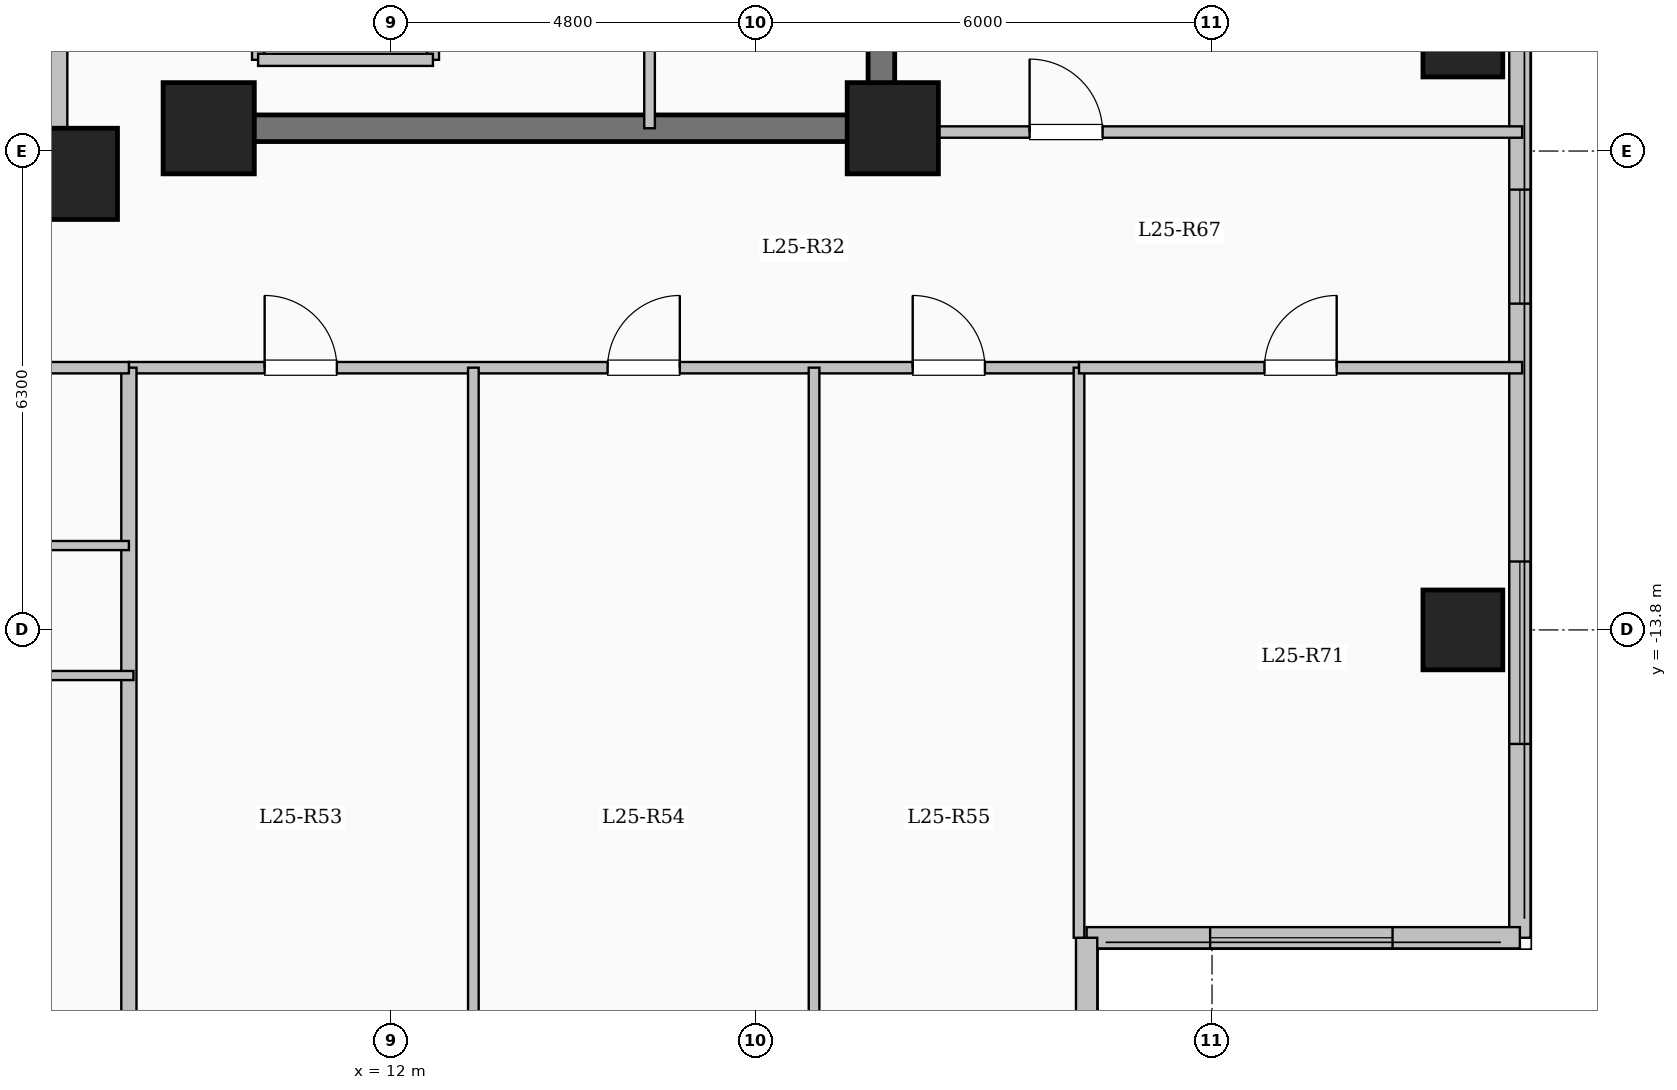
"""IFC4 building model, lengths in metres.
Left out: names, types, materials, properties, quantities, classifications, styles, units other than length and angle.
Written with IfcOpenShell. Run it as: python <this file> out.ifc"""

import sys

from ifc_helpers import new_model, si_unit, direction, frame, frame_2d, origin, origin_2d, place, context, subcontext, project, spatial, rectangle, extrude, element, fill, save


model = new_model("IFC4")
c1 = context("Model", 3, precision=1e-05, world=origin(), true_north=direction((0.0, 1.0)))
c2 = subcontext(c1, "Body", "Model", "MODEL_VIEW")
j1 = project(units=[si_unit("LENGTHUNIT", "METRE"), si_unit("PLANEANGLEUNIT", "RADIAN")], contexts=[c1])
p1 = place(None, origin())
s1 = spatial("IfcSite", under=j1, at=p1, CompositionType="ELEMENT")
p2 = place(p1, origin())
s2 = spatial("IfcBuilding", under=s1, at=p2, CompositionType="ELEMENT")
p3 = place(p2, frame((0.0, 0.0, 95.05)))
s3 = spatial("IfcBuildingStorey", under=s2, at=p3, CompositionType="ELEMENT", Elevation=95.05)
for number, where, z_axis, x_axis in (
    (1, (7.8, -7.8, 0.0), (0.0, 0.0, 1.0), (1.0, 0.0, 0.0)),
    (2, (9.6, -7.2, 0.0), (0.0, 0.0, 1.0), (1.0, 0.0, 0.0)),
    (3, (18.6, -7.2, 0.0), (0.0, 0.0, 1.0), (1.0, 0.0, 0.0)),
):
    element("IfcColumn", number, at=place(p3, frame(where, z_axis=z_axis, x_axis=x_axis)), inside=s3, PredefinedType="COLUMN", context=c2, shape_type="SweptSolid", body=[
        extrude(rectangle(XDim=1.2, YDim=1.2, at=origin_2d()), origin(), (0.0, 0.0, 1.0), 3.35),
    ])
for number, where, z_axis, x_axis in (
    (4, (26.1, -13.8, 0.0), (0.0, 0.0, 1.0), (1.0, 0.0, 0.0)),
    (5, (26.1, -6.0, 0.0), (0.0, 0.0, 1.0), (1.0, 0.0, 0.0)),
):
    element("IfcColumn", number, at=place(p3, frame(where, z_axis=z_axis, x_axis=x_axis)), inside=s3, PredefinedType="COLUMN", context=c2, shape_type="SweptSolid", body=[
        extrude(rectangle(XDim=1.05, YDim=1.05, at=origin_2d()), origin(), (0.0, 0.0, 1.0), 3.35),
    ])
p4 = place(p3, frame((-7.62, -7.62, 0.0), z_axis=(0.0, 0.0, 1.0), x_axis=(1.0, 0.0, 0.0)))
e6 = element("IfcWall", 6, at=p4, inside=s3, PredefinedType="SOLIDWALL", context=c2, shape_type="SweptSolid", body=[
    extrude(rectangle(XDim=15.24, YDim=0.24, at=frame_2d((7.62, 0.0))), origin(), (0.0, 0.0, 1.0), 3.1),
])
p5 = place(p4, frame((6.92, 0.0, 0.95)))
e7 = element("IfcOpeningElement", 7, at=p5, cuts=e6, PredefinedType="OPENING", context=c2, shape_type="SweptSolid", body=[
    extrude(rectangle(XDim=1.4, YDim=1.5, at=frame_2d((0.7, 0.75))), frame((0.0, 0.13, 0.0), z_axis=(0.0, -1.0, 0.0), x_axis=(1.0, 0.0, 0.0)), (0.0, 0.0, 1.0), 0.26),
])
p6 = place(p3, frame((7.62, -7.62, 0.0), z_axis=(0.0, 0.0, 1.0), x_axis=(0.0, 1.0, 0.0)))
e8 = element("IfcWall", 8, at=p6, inside=s3, PredefinedType="SOLIDWALL", context=c2, shape_type="SweptSolid", body=[
    extrude(rectangle(XDim=15.24, YDim=0.24, at=frame_2d((7.62, 0.0))), origin(), (0.0, 0.0, 1.0), 3.1),
])
p7 = place(p6, frame((6.92, 0.0, 0.95)))
e9 = element("IfcOpeningElement", 9, at=p7, cuts=e8, PredefinedType="OPENING", context=c2, shape_type="SweptSolid", body=[
    extrude(rectangle(XDim=1.4, YDim=1.5, at=frame_2d((0.7, 0.75))), frame((0.0, 0.13, 0.0), z_axis=(0.0, -1.0, 0.0), x_axis=(1.0, 0.0, 0.0)), (0.0, 0.0, 1.0), 0.26),
])
p8 = place(p3, frame((26.85, 17.85, 0.0), z_axis=(0.0, 0.0, 1.0), x_axis=(0.0, -1.0, 0.0)))
e10 = element("IfcWall", 10, at=p8, inside=s3, PredefinedType="SOLIDWALL", context=c2, shape_type="SweptSolid", body=[
    extrude(rectangle(XDim=35.7, YDim=0.28, at=frame_2d((17.85, 0.0))), origin(), (0.0, 0.0, 1.0), 3.1),
])
p9 = place(p8, frame((1.675, 0.0, 0.9)))
e11 = element("IfcOpeningElement", 11, at=p9, cuts=e10, PredefinedType="OPENING", context=c2, shape_type="SweptSolid", body=[
    extrude(rectangle(XDim=2.0, YDim=1.7, at=frame_2d((1.0, 0.85))), frame((0.0, 0.15, 0.0), z_axis=(0.0, -1.0, 0.0), x_axis=(1.0, 0.0, 0.0)), (0.0, 0.0, 1.0), 0.3),
])
p10 = place(p8, frame((5.725, 0.0, 0.95)))
e12 = element("IfcOpeningElement", 12, at=p10, cuts=e10, PredefinedType="OPENING", context=c2, shape_type="SweptSolid", body=[
    extrude(rectangle(XDim=1.0, YDim=1.5, at=frame_2d((0.5, 0.75))), frame((0.0, 0.15, 0.0), z_axis=(0.0, -1.0, 0.0), x_axis=(1.0, 0.0, 0.0)), (0.0, 0.0, 1.0), 0.3),
])
p11 = place(p8, frame((8.975, 0.0, 0.9)))
e13 = element("IfcOpeningElement", 13, at=p11, cuts=e10, PredefinedType="OPENING", context=c2, shape_type="SweptSolid", body=[
    extrude(rectangle(XDim=2.0, YDim=1.7, at=frame_2d((1.0, 0.85))), frame((0.0, 0.15, 0.0), z_axis=(0.0, -1.0, 0.0), x_axis=(1.0, 0.0, 0.0)), (0.0, 0.0, 1.0), 0.3),
])
p12 = place(p8, frame((13.725, 0.0, 0.9)))
e14 = element("IfcOpeningElement", 14, at=p12, cuts=e10, PredefinedType="OPENING", context=c2, shape_type="SweptSolid", body=[
    extrude(rectangle(XDim=1.8, YDim=1.65, at=frame_2d((0.9, 0.825))), frame((0.0, 0.15, 0.0), z_axis=(0.0, -1.0, 0.0), x_axis=(1.0, 0.0, 0.0)), (0.0, 0.0, 1.0), 0.3),
])
p13 = place(p8, frame((19.55, 0.0, 0.9)))
e15 = element("IfcOpeningElement", 15, at=p13, cuts=e10, PredefinedType="OPENING", context=c2, shape_type="SweptSolid", body=[
    extrude(rectangle(XDim=2.4, YDim=1.8, at=frame_2d((1.2, 0.9))), frame((0.0, 0.15, 0.0), z_axis=(0.0, -1.0, 0.0), x_axis=(1.0, 0.0, 0.0)), (0.0, 0.0, 1.0), 0.3),
])
p14 = place(p8, frame((25.857, 0.0, 0.9)))
e16 = element("IfcOpeningElement", 16, at=p14, cuts=e10, PredefinedType="OPENING", context=c2, shape_type="SweptSolid", body=[
    extrude(rectangle(XDim=1.5, YDim=1.65, at=frame_2d((0.75, 0.825))), frame((0.0, 0.15, 0.0), z_axis=(0.0, -1.0, 0.0), x_axis=(1.0, 0.0, 0.0)), (0.0, 0.0, 1.0), 0.3),
])
p15 = place(p8, frame((30.75, 0.0, 0.9)))
e17 = element("IfcOpeningElement", 17, at=p15, cuts=e10, PredefinedType="OPENING", context=c2, shape_type="SweptSolid", body=[
    extrude(rectangle(XDim=2.4, YDim=1.8, at=frame_2d((1.2, 0.9))), frame((0.0, 0.15, 0.0), z_axis=(0.0, -1.0, 0.0), x_axis=(1.0, 0.0, 0.0)), (0.0, 0.0, 1.0), 0.3),
])
p16 = place(p3, frame((26.85, -17.85, 0.0), z_axis=(0.0, 0.0, 1.0), x_axis=(-1.0, 0.0, 0.0)))
e18 = element("IfcWall", 18, at=p16, inside=s3, PredefinedType="SOLIDWALL", context=c2, shape_type="SweptSolid", body=[
    extrude(rectangle(XDim=5.7, YDim=0.28, at=frame_2d((2.85, 0.0))), origin(), (0.0, 0.0, 1.0), 3.1),
])
p17 = place(p16, frame((1.675, 0.0, 0.9)))
e19 = element("IfcOpeningElement", 19, at=p17, cuts=e18, PredefinedType="OPENING", context=c2, shape_type="SweptSolid", body=[
    extrude(rectangle(XDim=2.4, YDim=1.8, at=frame_2d((1.2, 0.9))), frame((0.0, 0.15, 0.0), z_axis=(0.0, -1.0, 0.0), x_axis=(1.0, 0.0, 0.0)), (0.0, 0.0, 1.0), 0.3),
])
p18 = place(p3, frame((21.15, -17.85, 0.0), z_axis=(0.0, 0.0, 1.0), x_axis=(0.0, -1.0, 0.0)))
e20 = element("IfcWall", 20, at=p18, inside=s3, PredefinedType="SOLIDWALL", context=c2, shape_type="SweptSolid", body=[
    extrude(rectangle(XDim=4.2, YDim=0.28, at=frame_2d((2.1, 0.0))), origin(), (0.0, 0.0, 1.0), 3.1),
])
p19 = place(p18, frame((1.082, 0.0, 0.9)))
e21 = element("IfcOpeningElement", 21, at=p19, cuts=e20, PredefinedType="OPENING", context=c2, shape_type="SweptSolid", body=[
    extrude(rectangle(XDim=2.0, YDim=1.7, at=frame_2d((1.0, 0.85))), frame((0.0, 0.15, 0.0), z_axis=(0.0, -1.0, 0.0), x_axis=(1.0, 0.0, 0.0)), (0.0, 0.0, 1.0), 0.3),
])
p20 = place(p3, frame((10.25, -6.3, 0.0), z_axis=(0.0, 0.0, 1.0), x_axis=(0.0, 1.0, 0.0)))
e22 = element("IfcWall", 22, at=p20, inside=s3, PredefinedType="SOLIDWALL", context=c2, shape_type="SweptSolid", body=[
    extrude(rectangle(XDim=2.6, YDim=0.16, at=frame_2d((1.3, 0.0))), origin(), (0.0, 0.0, 1.0), 3.1),
])
p21 = place(p20, frame((0.75, 0.0, 0.0)))
e23 = element("IfcOpeningElement", 23, at=p21, cuts=e22, PredefinedType="OPENING", context=c2, shape_type="SweptSolid", body=[
    extrude(rectangle(XDim=1.1, YDim=2.15, at=frame_2d((0.55, 1.075))), frame((0.0, 0.09, 0.0), z_axis=(0.0, -1.0, 0.0), x_axis=(1.0, 0.0, 0.0)), (0.0, 0.0, 1.0), 0.18),
])
p22 = place(p3, frame((12.55, -6.3, 0.0), z_axis=(0.0, 0.0, 1.0), x_axis=(0.0, 1.0, 0.0)))
e24 = element("IfcWall", 24, at=p22, inside=s3, PredefinedType="SOLIDWALL", context=c2, shape_type="SweptSolid", body=[
    extrude(rectangle(XDim=2.6, YDim=0.16, at=frame_2d((1.3, 0.0))), origin(), (0.0, 0.0, 1.0), 3.1),
])
p23 = place(p3, frame((10.25, -6.3, 0.0), z_axis=(0.0, 0.0, 1.0), x_axis=(1.0, 0.0, 0.0)))
e25 = element("IfcWall", 25, at=p23, inside=s3, PredefinedType="SOLIDWALL", context=c2, shape_type="SweptSolid", body=[
    extrude(rectangle(XDim=2.3, YDim=0.16, at=frame_2d((1.15, 0.0))), origin(), (0.0, 0.0, 1.0), 3.1),
])
p24 = place(p3, frame((18.45, -7.375, 0.0), z_axis=(0.0, 0.0, 1.0), x_axis=(0.0, 1.0, 0.0)))
e26 = element("IfcWall", 26, at=p24, inside=s3, PredefinedType="SHEAR", context=c2, shape_type="SweptSolid", body=[
    extrude(rectangle(XDim=14.05, YDim=0.35, at=frame_2d((7.025, 0.0))), origin(), (0.0, 0.0, 1.0), 3.35),
])
p25 = place(p3, frame((10.075, -7.2, 0.0), z_axis=(0.0, 0.0, 1.0), x_axis=(1.0, 0.0, 0.0)))
e27 = element("IfcWall", 27, at=p25, inside=s3, PredefinedType="SHEAR", context=c2, shape_type="SweptSolid", body=[
    extrude(rectangle(XDim=8.55, YDim=0.35, at=frame_2d((4.275, 0.0))), origin(), (0.0, 0.0, 1.0), 3.35),
])
p26 = place(p3, frame((15.4, -7.2, 0.0), z_axis=(0.0, 0.0, 1.0), x_axis=(0.0, 1.0, 0.0)))
e28 = element("IfcWall", 28, at=p26, inside=s3, PredefinedType="PARTITIONING", context=c2, shape_type="SweptSolid", body=[
    extrude(rectangle(XDim=10.45, YDim=0.14, at=frame_2d((5.225, 0.0))), origin(), (0.0, 0.0, 1.0), 3.1),
])
p27 = place(p26, frame((9.25, 0.0, 0.0)))
e29 = element("IfcOpeningElement", 29, at=p27, cuts=e28, PredefinedType="OPENING", context=c2, shape_type="SweptSolid", body=[
    extrude(rectangle(XDim=0.9, YDim=2.08, at=frame_2d((0.45, 1.04))), frame((0.0, 0.08, 0.0), z_axis=(0.0, -1.0, 0.0), x_axis=(1.0, 0.0, 0.0)), (0.0, 0.0, 1.0), 0.16),
])
p28 = place(p3, frame((8.55, -10.35, 0.0), z_axis=(0.0, 0.0, 1.0), x_axis=(1.0, 0.0, 0.0)))
e30 = element("IfcWall", 30, at=p28, inside=s3, PredefinedType="PARTITIONING", context=c2, shape_type="SweptSolid", body=[
    extrude(rectangle(XDim=12.5, YDim=0.15, at=frame_2d((6.25, 0.0))), origin(), (0.0, 0.0, 1.0), 3.1),
])
p29 = place(p28, frame((1.786, 0.0, 0.0)))
e31 = element("IfcOpeningElement", 31, at=p29, cuts=e30, PredefinedType="OPENING", context=c2, shape_type="SweptSolid", body=[
    extrude(rectangle(XDim=0.95, YDim=2.15, at=frame_2d((0.475, 1.075))), frame((0.0, 0.085, 0.0), z_axis=(0.0, -1.0, 0.0), x_axis=(1.0, 0.0, 0.0)), (0.0, 0.0, 1.0), 0.17),
])
p30 = place(p28, frame((6.298, 0.0, 0.0)))
e32 = element("IfcOpeningElement", 32, at=p30, cuts=e30, PredefinedType="OPENING", context=c2, shape_type="SweptSolid", body=[
    extrude(rectangle(XDim=0.95, YDim=2.15, at=frame_2d((0.475, 1.075))), frame((0.0, 0.085, 0.0), z_axis=(0.0, -1.0, 0.0), x_axis=(1.0, 0.0, 0.0)), (0.0, 0.0, 1.0), 0.17),
])
p31 = place(p28, frame((10.312, 0.0, 0.0)))
e33 = element("IfcOpeningElement", 33, at=p31, cuts=e30, PredefinedType="OPENING", context=c2, shape_type="SweptSolid", body=[
    extrude(rectangle(XDim=0.95, YDim=2.15, at=frame_2d((0.475, 1.075))), frame((0.0, 0.085, 0.0), z_axis=(0.0, -1.0, 0.0), x_axis=(1.0, 0.0, 0.0)), (0.0, 0.0, 1.0), 0.17),
])
for number, where, z_axis, x_axis in (
    (34, (13.082, -22.05, 0.0), (0.0, 0.0, 1.0), (0.0, 1.0, 0.0)),
    (35, (17.564, -22.05, 0.0), (0.0, 0.0, 1.0), (0.0, 1.0, 0.0)),
):
    element("IfcWall", number, at=place(p3, frame(where, z_axis=z_axis, x_axis=x_axis)), inside=s3, PredefinedType="PARTITIONING", context=c2, shape_type="SweptSolid", body=[
        extrude(rectangle(XDim=11.7, YDim=0.14, at=frame_2d((5.85, 0.0))), origin(), (0.0, 0.0, 1.0), 3.1),
    ])
p32 = place(p3, frame((8.55, -22.704, 0.0), z_axis=(0.0, 0.0, 1.0), x_axis=(0.0, 1.0, 0.0)))
e36 = element("IfcWall", 36, at=p32, inside=s3, PredefinedType="SOLIDWALL", context=c2, shape_type="SweptSolid", body=[
    extrude(rectangle(XDim=12.354, YDim=0.2, at=frame_2d((6.177, 0.0))), origin(), (0.0, 0.0, 1.0), 3.1),
])
p33 = place(p3, frame((-8.55, -10.35, 0.0), z_axis=(0.0, 0.0, 1.0), x_axis=(1.0, 0.0, 0.0)))
e37 = element("IfcWall", 37, at=p33, inside=s3, PredefinedType="PARTITIONING", context=c2, shape_type="SweptSolid", body=[
    extrude(rectangle(XDim=17.1, YDim=0.15, at=frame_2d((8.55, 0.0))), origin(), (0.0, 0.0, 1.0), 3.1),
])
p34 = place(p33, frame((1.6, 0.0, 0.0)))
e38 = element("IfcOpeningElement", 38, at=p34, cuts=e37, PredefinedType="OPENING", context=c2, shape_type="SweptSolid", body=[
    extrude(rectangle(XDim=0.96, YDim=2.15, at=frame_2d((0.48, 1.075))), frame((0.0, 0.085, 0.0), z_axis=(0.0, -1.0, 0.0), x_axis=(1.0, 0.0, 0.0)), (0.0, 0.0, 1.0), 0.17),
])
p35 = place(p3, frame((3.219, -12.69, 0.0), z_axis=(0.0, 0.0, 1.0), x_axis=(1.0, 0.0, 0.0)))
e39 = element("IfcWall", 39, at=p35, inside=s3, PredefinedType="PARTITIONING", context=c2, shape_type="SweptSolid", body=[
    extrude(rectangle(XDim=5.331, YDim=0.12, at=frame_2d((2.666, 0.0))), origin(), (0.0, 0.0, 1.0), 2.635),
])
p36 = place(p35, frame((2.226, 0.0, 0.0)))
e40 = element("IfcOpeningElement", 40, at=p36, cuts=e39, PredefinedType="OPENING", context=c2, shape_type="SweptSolid", body=[
    extrude(rectangle(XDim=0.88, YDim=2.1, at=frame_2d((0.44, 1.05))), frame((0.0, 0.07, 0.0), z_axis=(0.0, -1.0, 0.0), x_axis=(1.0, 0.0, 0.0)), (0.0, 0.0, 1.0), 0.14),
])
p37 = place(p3, frame((-2.774, -14.4, 0.0), z_axis=(0.0, 0.0, 1.0), x_axis=(1.0, 0.0, 0.0)))
e41 = element("IfcWall", 41, at=p37, inside=s3, PredefinedType="PARTITIONING", context=c2, shape_type="SweptSolid", body=[
    extrude(rectangle(XDim=11.384, YDim=0.12, at=frame_2d((5.692, 0.0))), origin(), (0.0, 0.0, 1.0), 2.635),
])
p38 = place(p37, frame((1.426, 0.0, 0.0)))
e42 = element("IfcOpeningElement", 42, at=p38, cuts=e41, PredefinedType="OPENING", context=c2, shape_type="SweptSolid", body=[
    extrude(rectangle(XDim=0.88, YDim=2.1, at=frame_2d((0.44, 1.05))), frame((0.0, 0.07, 0.0), z_axis=(0.0, -1.0, 0.0), x_axis=(1.0, 0.0, 0.0)), (0.0, 0.0, 1.0), 0.14),
])
p39 = place(p37, frame((5.157, 0.0, 0.0)))
e43 = element("IfcOpeningElement", 43, at=p39, cuts=e41, PredefinedType="OPENING", context=c2, shape_type="SweptSolid", body=[
    extrude(rectangle(XDim=0.88, YDim=2.1, at=frame_2d((0.44, 1.05))), frame((0.0, 0.07, 0.0), z_axis=(0.0, -1.0, 0.0), x_axis=(1.0, 0.0, 0.0)), (0.0, 0.0, 1.0), 0.14),
])
p40 = place(p37, frame((8.888, 0.0, 0.0)))
e44 = element("IfcOpeningElement", 44, at=p40, cuts=e41, PredefinedType="OPENING", context=c2, shape_type="SweptSolid", body=[
    extrude(rectangle(XDim=0.88, YDim=2.1, at=frame_2d((0.44, 1.05))), frame((0.0, 0.07, 0.0), z_axis=(0.0, -1.0, 0.0), x_axis=(1.0, 0.0, 0.0)), (0.0, 0.0, 1.0), 0.14),
])
p41 = place(p3, frame((18.45, -7.25, 0.0), z_axis=(0.0, 0.0, 1.0), x_axis=(1.0, 0.0, 0.0)))
e45 = element("IfcWall", 45, at=p41, inside=s3, PredefinedType="PARTITIONING", context=c2, shape_type="SweptSolid", body=[
    extrude(rectangle(XDim=8.43, YDim=0.15, at=frame_2d((4.215, 0.0))), origin(), (0.0, 0.0, 1.0), 3.1),
])
p42 = place(p41, frame((1.95, 0.0, 0.0)))
e46 = element("IfcOpeningElement", 46, at=p42, cuts=e45, PredefinedType="OPENING", context=c2, shape_type="SweptSolid", body=[
    extrude(rectangle(XDim=0.96, YDim=2.15, at=frame_2d((0.48, 1.075))), frame((0.0, 0.085, 0.0), z_axis=(0.0, -1.0, 0.0), x_axis=(1.0, 0.0, 0.0)), (0.0, 0.0, 1.0), 0.17),
])
p43 = place(p3, frame((21.05, -17.85, 0.0), z_axis=(0.0, 0.0, 1.0), x_axis=(0.0, 1.0, 0.0)))
e47 = element("IfcWall", 47, at=p43, inside=s3, PredefinedType="PARTITIONING", context=c2, shape_type="SweptSolid", body=[
    extrude(rectangle(XDim=7.5, YDim=0.14, at=frame_2d((3.75, 0.0))), origin(), (0.0, 0.0, 1.0), 3.1),
])
p44 = place(p3, frame((21.05, -10.35, 0.0), z_axis=(0.0, 0.0, 1.0), x_axis=(1.0, 0.0, 0.0)))
e48 = element("IfcWall", 48, at=p44, inside=s3, PredefinedType="PARTITIONING", context=c2, shape_type="SweptSolid", body=[
    extrude(rectangle(XDim=5.83, YDim=0.15, at=frame_2d((2.915, 0.0))), origin(), (0.0, 0.0, 1.0), 3.1),
])
p45 = place(p44, frame((2.44, 0.0, 0.0)))
e49 = element("IfcOpeningElement", 49, at=p45, cuts=e48, PredefinedType="OPENING", context=c2, shape_type="SweptSolid", body=[
    extrude(rectangle(XDim=0.95, YDim=2.15, at=frame_2d((0.475, 1.075))), frame((0.0, 0.085, 0.0), z_axis=(0.0, -1.0, 0.0), x_axis=(1.0, 0.0, 0.0)), (0.0, 0.0, 1.0), 0.17),
])
p46 = place(p14, origin())
e50 = element("IfcWindow", 50, at=p46, inside=s3, PartitioningType="SINGLE_PANEL", PredefinedType="WINDOW", context=c2, shape_type="SweptSolid", body=[
    extrude(rectangle(XDim=1.5, YDim=1.65, at=frame_2d((0.75, 0.825))), frame((0.0, 0.03, 0.0), z_axis=(0.0, -1.0, 0.0), x_axis=(1.0, 0.0, 0.0)), (0.0, 0.0, 1.0), 0.06),
])
fill(e16, e50)
p47 = place(p15, origin())
e51 = element("IfcWindow", 51, at=p47, inside=s3, PartitioningType="SINGLE_PANEL", PredefinedType="WINDOW", context=c2, shape_type="SweptSolid", body=[
    extrude(rectangle(XDim=2.4, YDim=1.8, at=frame_2d((1.2, 0.9))), frame((0.0, 0.03, 0.0), z_axis=(0.0, -1.0, 0.0), x_axis=(1.0, 0.0, 0.0)), (0.0, 0.0, 1.0), 0.06),
])
fill(e17, e51)
p48 = place(p17, origin())
e52 = element("IfcWindow", 52, at=p48, inside=s3, PartitioningType="SINGLE_PANEL", PredefinedType="WINDOW", context=c2, shape_type="SweptSolid", body=[
    extrude(rectangle(XDim=2.4, YDim=1.8, at=frame_2d((1.2, 0.9))), frame((0.0, 0.03, 0.0), z_axis=(0.0, -1.0, 0.0), x_axis=(1.0, 0.0, 0.0)), (0.0, 0.0, 1.0), 0.06),
])
fill(e19, e52)
p49 = place(p29, origin())
e53 = element("IfcDoor", 53, at=p49, inside=s3, OperationType="SINGLE_SWING_LEFT", PredefinedType="DOOR", context=c2, shape_type="SweptSolid", body=[
    extrude(rectangle(XDim=0.95, YDim=2.15, at=frame_2d((0.475, 1.075))), frame((0.0, 0.025, 0.0), z_axis=(0.0, -1.0, 0.0), x_axis=(1.0, 0.0, 0.0)), (0.0, 0.0, 1.0), 0.05),
])
fill(e31, e53)
p50 = place(p30, origin())
e54 = element("IfcDoor", 54, at=p50, inside=s3, OperationType="SINGLE_SWING_RIGHT", PredefinedType="DOOR", context=c2, shape_type="SweptSolid", body=[
    extrude(rectangle(XDim=0.95, YDim=2.15, at=frame_2d((0.475, 1.075))), frame((0.0, 0.025, 0.0), z_axis=(0.0, -1.0, 0.0), x_axis=(1.0, 0.0, 0.0)), (0.0, 0.0, 1.0), 0.05),
])
fill(e32, e54)
p51 = place(p31, origin())
e55 = element("IfcDoor", 55, at=p51, inside=s3, OperationType="SINGLE_SWING_LEFT", PredefinedType="DOOR", context=c2, shape_type="SweptSolid", body=[
    extrude(rectangle(XDim=0.95, YDim=2.15, at=frame_2d((0.475, 1.075))), frame((0.0, 0.025, 0.0), z_axis=(0.0, -1.0, 0.0), x_axis=(1.0, 0.0, 0.0)), (0.0, 0.0, 1.0), 0.05),
])
fill(e33, e55)
p52 = place(p45, origin())
e56 = element("IfcDoor", 56, at=p52, inside=s3, OperationType="SINGLE_SWING_RIGHT", PredefinedType="DOOR", context=c2, shape_type="SweptSolid", body=[
    extrude(rectangle(XDim=0.95, YDim=2.15, at=frame_2d((0.475, 1.075))), frame((0.0, 0.025, 0.0), z_axis=(0.0, -1.0, 0.0), x_axis=(1.0, 0.0, 0.0)), (0.0, 0.0, 1.0), 0.05),
])
fill(e49, e56)
p53 = place(p42, origin())
e57 = element("IfcDoor", 57, at=p53, inside=s3, OperationType="SINGLE_SWING_LEFT", PredefinedType="DOOR", context=c2, shape_type="SweptSolid", body=[
    extrude(rectangle(XDim=0.96, YDim=2.15, at=frame_2d((0.48, 1.075))), frame((0.0, 0.025, 0.0), z_axis=(0.0, -1.0, 0.0), x_axis=(1.0, 0.0, 0.0)), (0.0, 0.0, 1.0), 0.05),
])
fill(e46, e57)
save(model, sys.argv[1])
